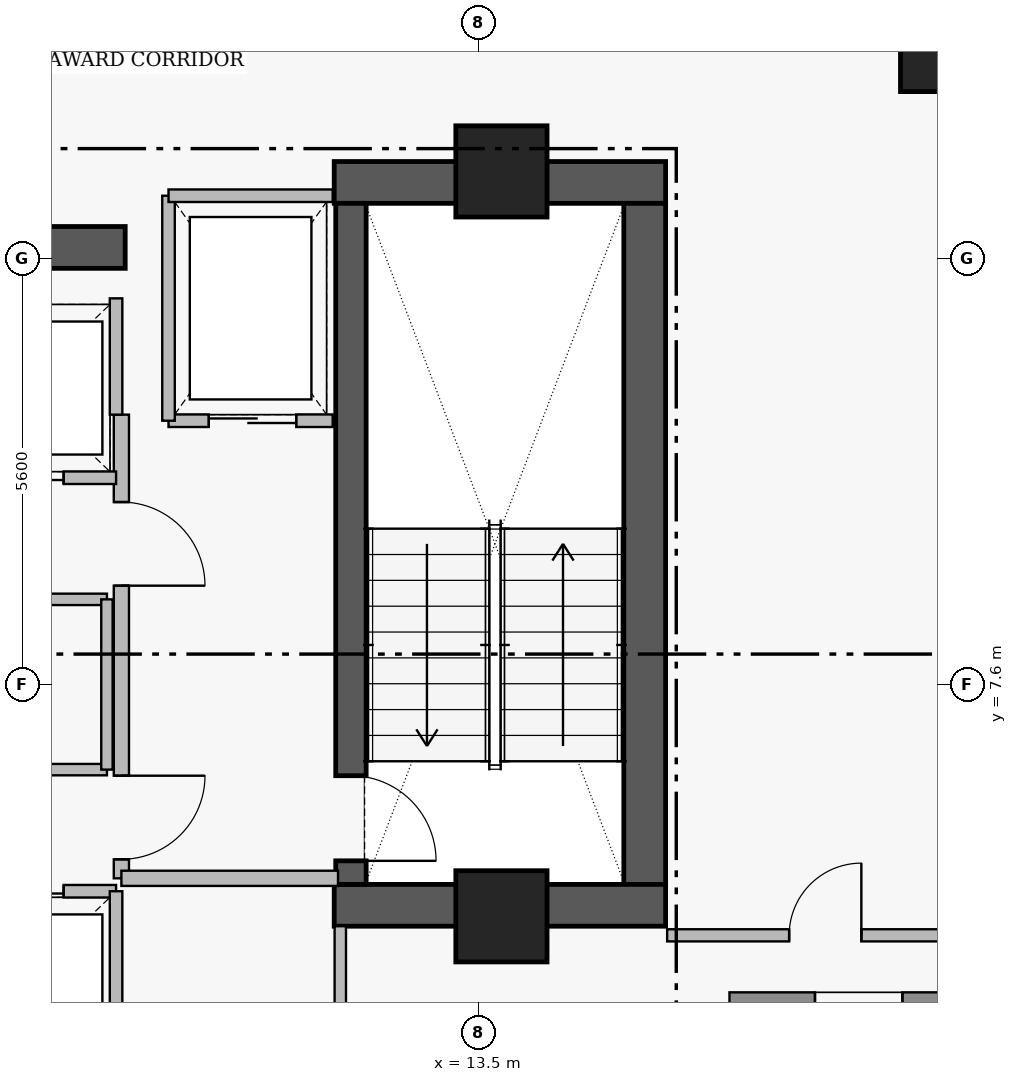
"""IFC4 building model, lengths in metres.
Left out: names, types, materials, properties, quantities, classifications, styles, units other than length and angle.
Written with IfcOpenShell. Run it as: python <this file> out.ifc"""

import sys

from ifc_helpers import new_model, si_unit, direction, frame, frame_2d, origin, origin_2d, place, context, subcontext, project, spatial, rectangle, extrude, element, fill, save


model = new_model("IFC4")
c1 = context("Model", 3, precision=1e-05, world=origin(), true_north=direction((0.0, 1.0)))
c2 = subcontext(c1, "Body", "Model", "MODEL_VIEW")
j1 = project(units=[si_unit("LENGTHUNIT", "METRE"), si_unit("PLANEANGLEUNIT", "RADIAN")], contexts=[c1])
p1 = place(None, origin())
s1 = spatial("IfcSite", under=j1, at=p1, CompositionType="ELEMENT")
p2 = place(p1, origin())
s2 = spatial("IfcBuilding", under=s1, at=p2, CompositionType="ELEMENT")
p3 = place(p2, frame((0.0, 0.0, 239.65)))
s3 = spatial("IfcBuildingStorey", under=s2, at=p3, CompositionType="ELEMENT", Elevation=239.65)
p4 = place(p3, frame((11.6, 14.205, 0.0), z_axis=(0.0, 0.0, 1.0), x_axis=(1.0, 0.0, 0.0)))
e1 = element("IfcWall", 1, at=p4, inside=s3, PredefinedType="SHEAR", context=c2, shape_type="SweptSolid", body=[
    extrude(rectangle(XDim=4.36, YDim=0.55, at=frame_2d((2.18, 0.0))), origin(), (0.0, 0.0, 1.0), 3.51),
])
p5 = place(p3, frame((15.685, 4.97, 0.0), z_axis=(0.0, 0.0, 1.0), x_axis=(0.0, 1.0, 0.0)))
e2 = element("IfcWall", 2, at=p5, inside=s3, PredefinedType="SHEAR", context=c2, shape_type="SweptSolid", body=[
    extrude(rectangle(XDim=8.96, YDim=0.55, at=frame_2d((4.48, 0.0))), origin(), (0.0, 0.0, 1.0), 3.51),
])
p6 = place(p3, frame((11.6, 4.695, 0.0), z_axis=(0.0, 0.0, 1.0), x_axis=(1.0, 0.0, 0.0)))
e3 = element("IfcWall", 3, at=p6, inside=s3, PredefinedType="SHEAR", context=c2, shape_type="SweptSolid", body=[
    extrude(rectangle(XDim=4.36, YDim=0.55, at=frame_2d((2.18, 0.0))), origin(), (0.0, 0.0, 1.0), 3.51),
])
p7 = place(p3, frame((1.25, 13.35, 0.0), z_axis=(0.0, 0.0, 1.0), x_axis=(1.0, 0.0, 0.0)))
e4 = element("IfcWall", 4, at=p7, inside=s3, PredefinedType="SHEAR", context=c2, shape_type="SweptSolid", body=[
    extrude(rectangle(XDim=7.6, YDim=0.55, at=frame_2d((3.8, 0.0))), origin(), (0.0, 0.0, 1.0), 3.48),
])
p8 = place(p3, frame((11.82, 13.93, 0.0), z_axis=(0.0, 0.0, 1.0), x_axis=(0.0, -1.0, 0.0)))
e5 = element("IfcWall", 5, at=p8, inside=s3, PredefinedType="SHEAR", context=c2, shape_type="SweptSolid", body=[
    extrude(rectangle(XDim=8.96, YDim=0.4, at=frame_2d((4.48, 0.0))), origin(), (0.0, 0.0, 1.0), 3.51),
])
p9 = place(p8, frame((7.53, 0.0, 0.0)))
e6 = element("IfcOpeningElement", 6, at=p9, cuts=e5, PredefinedType="OPENING", context=c2, shape_type="SweptSolid", body=[
    extrude(rectangle(XDim=1.12, YDim=2.22, at=frame_2d((0.56, 1.11))), frame((0.0, 0.21, 0.0), z_axis=(0.0, -1.0, 0.0), x_axis=(1.0, 0.0, 0.0)), (0.0, 0.0, 1.0), 0.42),
])
for number, where, z_axis, x_axis in (
    (7, (13.8, 14.35, 0.0), (0.0, 0.0, 1.0), (1.0, 0.0, 0.0)),
    (8, (13.8, 4.55, 0.0), (0.0, 0.0, 1.0), (1.0, 0.0, 0.0)),
):
    element("IfcColumn", number, at=place(p3, frame(where, z_axis=z_axis, x_axis=x_axis)), inside=s3, PredefinedType="COLUMN", context=c2, shape_type="SweptSolid", body=[
        extrude(rectangle(XDim=1.2, YDim=1.2, at=origin_2d()), origin(), (0.0, 0.0, 1.0), 3.7),
    ])
p10 = place(p3, frame((19.55, 15.9, 0.43), z_axis=(0.0, 0.0, 1.0), x_axis=(1.0, 0.0, 0.0)))
e9 = element("IfcColumn", 9, at=p10, inside=s3, PredefinedType="COLUMN", context=c2, shape_type="SweptSolid", body=[
    extrude(rectangle(XDim=1.0, YDim=1.0, at=origin_2d()), origin(), (0.0, 0.0, 1.0), 3.27),
])
p11 = place(p3, frame((20.2, 3.4, 0.0), z_axis=(0.0, 0.0, 1.0), x_axis=(-1.0, 0.0, 0.0)))
e10 = element("IfcWall", 10, at=p11, inside=s3, PredefinedType="STANDARD", context=c2, shape_type="SweptSolid", body=[
    extrude(rectangle(XDim=3.4, YDim=0.3, at=frame_2d((1.7, 0.0))), origin(), (0.0, 0.0, 1.0), 3.48),
])
p12 = place(p11, frame((1.125, 0.0, 1.25)))
e11 = element("IfcOpeningElement", 11, at=p12, cuts=e10, PredefinedType="OPENING", context=c2, shape_type="SweptSolid", body=[
    extrude(rectangle(XDim=1.15, YDim=1.55, at=frame_2d((0.575, 0.775))), frame((0.0, 0.16, 0.0), z_axis=(0.0, -1.0, 0.0), x_axis=(1.0, 0.0, 0.0)), (0.0, 0.0, 1.0), 0.32),
])
p13 = place(p3, frame((8.8, 11.15, 0.0), z_axis=(0.0, 0.0, 1.0), x_axis=(0.0, -1.0, 0.0)))
e12 = element("IfcWall", 12, at=p13, inside=s3, PredefinedType="PARTITIONING", context=c2, shape_type="SweptSolid", body=[
    extrude(rectangle(XDim=6.1, YDim=0.2, at=frame_2d((3.05, 0.0))), origin(), (0.0, 0.0, 1.0), 3.48),
])
p14 = place(p13, frame((1.15, 0.0, 0.0)))
e13 = element("IfcOpeningElement", 13, at=p14, cuts=e12, PredefinedType="OPENING", context=c2, shape_type="SweptSolid", body=[
    extrude(rectangle(XDim=1.1, YDim=2.2, at=frame_2d((0.55, 1.1))), frame((0.0, 0.11, 0.0), z_axis=(0.0, -1.0, 0.0), x_axis=(1.0, 0.0, 0.0)), (0.0, 0.0, 1.0), 0.22),
])
p15 = place(p13, frame((4.75, 0.0, 0.0)))
e14 = element("IfcOpeningElement", 14, at=p15, cuts=e12, PredefinedType="OPENING", context=c2, shape_type="SweptSolid", body=[
    extrude(rectangle(XDim=1.1, YDim=2.2, at=frame_2d((0.55, 1.1))), frame((0.0, 0.11, 0.0), z_axis=(0.0, -1.0, 0.0), x_axis=(1.0, 0.0, 0.0)), (0.0, 0.0, 1.0), 0.22),
])
p16 = place(p3, frame((9.42, 11.07, 0.0), z_axis=(0.0, 0.0, 1.0), x_axis=(1.0, 0.0, 0.0)))
e15 = element("IfcWall", 15, at=p16, inside=s3, PredefinedType="PARTITIONING", context=c2, shape_type="SweptSolid", body=[
    extrude(rectangle(XDim=2.16, YDim=0.165, at=frame_2d((1.08, 0.0))), origin(), (0.0, 0.0, 1.0), 3.48),
])
p17 = place(p16, frame((0.53, 0.0, 0.0)))
e16 = element("IfcOpeningElement", 16, at=p17, cuts=e15, PredefinedType="OPENING", context=c2, shape_type="SweptSolid", body=[
    extrude(rectangle(XDim=1.15, YDim=2.25, at=frame_2d((0.575, 1.125))), frame((0.0, 0.093, 0.0), z_axis=(0.0, -1.0, 0.0), x_axis=(1.0, 0.0, 0.0)), (0.0, 0.0, 1.0), 0.185),
])
p18 = place(p3, frame((6.25, 4.88, 0.0), z_axis=(0.0, 0.0, 1.0), x_axis=(1.0, 0.0, 0.0)))
e17 = element("IfcWall", 17, at=p18, inside=s3, PredefinedType="PARTITIONING", context=c2, shape_type="SweptSolid", body=[
    extrude(rectangle(XDim=2.48, YDim=0.165, at=frame_2d((1.24, 0.0))), origin(), (0.0, 0.0, 1.0), 3.48),
])
p19 = place(p18, frame((0.69, 0.0, 0.0)))
e18 = element("IfcOpeningElement", 18, at=p19, cuts=e17, PredefinedType="OPENING", context=c2, shape_type="SweptSolid", body=[
    extrude(rectangle(XDim=1.1, YDim=2.25, at=frame_2d((0.55, 1.125))), frame((0.0, 0.093, 0.0), z_axis=(0.0, -1.0, 0.0), x_axis=(1.0, 0.0, 0.0)), (0.0, 0.0, 1.0), 0.185),
])
p20 = place(p3, frame((6.25, 10.32, 0.0), z_axis=(0.0, 0.0, 1.0), x_axis=(1.0, 0.0, 0.0)))
e19 = element("IfcWall", 19, at=p20, inside=s3, PredefinedType="PARTITIONING", context=c2, shape_type="SweptSolid", body=[
    extrude(rectangle(XDim=2.48, YDim=0.165, at=frame_2d((1.24, 0.0))), origin(), (0.0, 0.0, 1.0), 3.48),
])
p21 = place(p20, frame((0.69, 0.0, 0.0)))
e20 = element("IfcOpeningElement", 20, at=p21, cuts=e19, PredefinedType="OPENING", context=c2, shape_type="SweptSolid", body=[
    extrude(rectangle(XDim=1.1, YDim=2.25, at=frame_2d((0.55, 1.125))), frame((0.0, 0.093, 0.0), z_axis=(0.0, -1.0, 0.0), x_axis=(1.0, 0.0, 0.0)), (0.0, 0.0, 1.0), 0.185),
])
p22 = place(p3, frame((6.14, 8.72, 0.0), z_axis=(0.0, 0.0, 1.0), x_axis=(1.0, 0.0, 0.0)))
e21 = element("IfcWall", 21, at=p22, inside=s3, PredefinedType="PARTITIONING", context=c2, shape_type="SweptSolid", body=[
    extrude(rectangle(XDim=2.47, YDim=0.15, at=frame_2d((1.235, 0.0))), origin(), (0.0, 0.0, 1.0), 3.48),
])
p23 = place(p22, frame((0.785, 0.0, 0.0)))
e22 = element("IfcOpeningElement", 22, at=p23, cuts=e21, PredefinedType="OPENING", context=c2, shape_type="SweptSolid", body=[
    extrude(rectangle(XDim=0.9, YDim=2.15, at=frame_2d((0.45, 1.075))), frame((0.0, 0.085, 0.0), z_axis=(0.0, -1.0, 0.0), x_axis=(1.0, 0.0, 0.0)), (0.0, 0.0, 1.0), 0.17),
])
p24 = place(p3, frame((15.98, 4.3, 0.0), z_axis=(0.0, 0.0, 1.0), x_axis=(1.0, 0.0, 0.0)))
e23 = element("IfcWall", 23, at=p24, inside=s3, PredefinedType="PARTITIONING", context=c2, shape_type="SweptSolid", body=[
    extrude(rectangle(XDim=4.16, YDim=0.16, at=frame_2d((2.08, 0.0))), origin(), (0.0, 0.0, 1.0), 3.48),
])
p25 = place(p24, frame((1.605, 0.0, 0.0)))
e24 = element("IfcOpeningElement", 24, at=p25, cuts=e23, PredefinedType="OPENING", context=c2, shape_type="SweptSolid", body=[
    extrude(rectangle(XDim=0.95, YDim=2.15, at=frame_2d((0.475, 1.075))), frame((0.0, 0.09, 0.0), z_axis=(0.0, -1.0, 0.0), x_axis=(1.0, 0.0, 0.0)), (0.0, 0.0, 1.0), 0.18),
])
p26 = place(p3, frame((8.8, 5.05, 0.0), z_axis=(0.0, 0.0, 1.0), x_axis=(1.0, 0.0, 0.0)))
e25 = element("IfcWall", 25, at=p26, inside=s3, PredefinedType="PARTITIONING", context=c2, shape_type="SweptSolid", body=[
    extrude(rectangle(XDim=2.85, YDim=0.2, at=frame_2d((1.425, 0.0))), origin(), (0.0, 0.0, 1.0), 3.48),
])
p27 = place(p3, frame((9.42, 11.07, 0.0), z_axis=(0.0, 0.0, 1.0), x_axis=(0.0, 1.0, 0.0)))
e26 = element("IfcWall", 26, at=p27, inside=s3, PredefinedType="PARTITIONING", context=c2, shape_type="SweptSolid", body=[
    extrude(rectangle(XDim=2.96, YDim=0.165, at=frame_2d((1.48, 0.0))), origin(), (0.0, 0.0, 1.0), 3.48),
])
p28 = place(p3, frame((9.42, 14.03, 0.0), z_axis=(0.0, 0.0, 1.0), x_axis=(1.0, 0.0, 0.0)))
e27 = element("IfcWall", 27, at=p28, inside=s3, PredefinedType="PARTITIONING", context=c2, shape_type="SweptSolid", body=[
    extrude(rectangle(XDim=2.16, YDim=0.165, at=frame_2d((1.08, 0.0))), origin(), (0.0, 0.0, 1.0), 3.48),
])
p29 = place(p3, frame((8.73, 2.52, 0.0), z_axis=(0.0, 0.0, 1.0), x_axis=(0.0, 1.0, 0.0)))
e28 = element("IfcWall", 28, at=p29, inside=s3, PredefinedType="PARTITIONING", context=c2, shape_type="SweptSolid", body=[
    extrude(rectangle(XDim=2.36, YDim=0.165, at=frame_2d((1.18, 0.0))), origin(), (0.0, 0.0, 1.0), 3.48),
])
p30 = place(p3, frame((8.73, 11.15, 0.0), z_axis=(0.0, 0.0, 1.0), x_axis=(0.0, 1.0, 0.0)))
e29 = element("IfcWall", 29, at=p30, inside=s3, PredefinedType="PARTITIONING", context=c2, shape_type="SweptSolid", body=[
    extrude(rectangle(XDim=1.53, YDim=0.165, at=frame_2d((0.765, 0.0))), origin(), (0.0, 0.0, 1.0), 3.48),
])
p31 = place(p3, frame((6.14, 6.48, 0.0), z_axis=(0.0, 0.0, 1.0), x_axis=(1.0, 0.0, 0.0)))
e30 = element("IfcWall", 30, at=p31, inside=s3, PredefinedType="PARTITIONING", context=c2, shape_type="SweptSolid", body=[
    extrude(rectangle(XDim=2.47, YDim=0.15, at=frame_2d((1.235, 0.0))), origin(), (0.0, 0.0, 1.0), 3.48),
])
p32 = place(p3, frame((8.61, 6.48, 0.0), z_axis=(0.0, 0.0, 1.0), x_axis=(0.0, 1.0, 0.0)))
e31 = element("IfcWall", 31, at=p32, inside=s3, PredefinedType="PARTITIONING", context=c2, shape_type="SweptSolid", body=[
    extrude(rectangle(XDim=2.24, YDim=0.15, at=frame_2d((1.12, 0.0))), origin(), (0.0, 0.0, 1.0), 3.48),
])
p33 = place(p3, frame((11.68, 1.72, 0.0), z_axis=(0.0, 0.0, 1.0), x_axis=(0.0, 1.0, 0.0)))
e32 = element("IfcWall", 32, at=p33, inside=s3, PredefinedType="PARTITIONING", context=c2, shape_type="SweptSolid", body=[
    extrude(rectangle(XDim=2.7, YDim=0.15, at=frame_2d((1.35, 0.0))), origin(), (0.0, 0.0, 1.0), 3.48),
])
p34 = place(p12, origin())
e33 = element("IfcWindow", 33, at=p34, inside=s3, PartitioningType="SINGLE_PANEL", PredefinedType="WINDOW", context=c2, shape_type="SweptSolid", body=[
    extrude(rectangle(XDim=1.15, YDim=1.55, at=frame_2d((0.575, 0.775))), frame((0.0, 0.03, 0.0), z_axis=(0.0, -1.0, 0.0), x_axis=(1.0, 0.0, 0.0)), (0.0, 0.0, 1.0), 0.06),
])
fill(e11, e33)
p35 = place(p9, origin())
e34 = element("IfcDoor", 34, at=p35, inside=s3, OperationType="SINGLE_SWING_RIGHT", PredefinedType="DOOR", context=c2, shape_type="SweptSolid", body=[
    extrude(rectangle(XDim=1.12, YDim=2.22, at=frame_2d((0.56, 1.11))), frame((0.0, 0.025, 0.0), z_axis=(0.0, -1.0, 0.0), x_axis=(1.0, 0.0, 0.0)), (0.0, 0.0, 1.0), 0.05),
])
fill(e6, e34)
p36 = place(p14, origin())
e35 = element("IfcDoor", 35, at=p36, inside=s3, OperationType="SINGLE_SWING_RIGHT", PredefinedType="DOOR", context=c2, shape_type="SweptSolid", body=[
    extrude(rectangle(XDim=1.1, YDim=2.2, at=frame_2d((0.55, 1.1))), frame((0.0, 0.025, 0.0), z_axis=(0.0, -1.0, 0.0), x_axis=(1.0, 0.0, 0.0)), (0.0, 0.0, 1.0), 0.05),
])
fill(e13, e35)
p37 = place(p15, origin())
e36 = element("IfcDoor", 36, at=p37, inside=s3, OperationType="SINGLE_SWING_LEFT", PredefinedType="DOOR", context=c2, shape_type="SweptSolid", body=[
    extrude(rectangle(XDim=1.1, YDim=2.2, at=frame_2d((0.55, 1.1))), frame((0.0, 0.025, 0.0), z_axis=(0.0, -1.0, 0.0), x_axis=(1.0, 0.0, 0.0)), (0.0, 0.0, 1.0), 0.05),
])
fill(e14, e36)
p38 = place(p17, origin())
e37 = element("IfcDoor", 37, at=p38, inside=s3, OperationType="SLIDING_TO_LEFT", PredefinedType="DOOR", context=c2, shape_type="SweptSolid", body=[
    extrude(rectangle(XDim=1.15, YDim=2.25, at=frame_2d((0.575, 1.125))), frame((0.0, 0.025, 0.0), z_axis=(0.0, -1.0, 0.0), x_axis=(1.0, 0.0, 0.0)), (0.0, 0.0, 1.0), 0.05),
])
fill(e16, e37)
p39 = place(p19, origin())
e38 = element("IfcDoor", 38, at=p39, inside=s3, OperationType="SLIDING_TO_LEFT", PredefinedType="DOOR", context=c2, shape_type="SweptSolid", body=[
    extrude(rectangle(XDim=1.1, YDim=2.25, at=frame_2d((0.55, 1.125))), frame((0.0, 0.025, 0.0), z_axis=(0.0, -1.0, 0.0), x_axis=(1.0, 0.0, 0.0)), (0.0, 0.0, 1.0), 0.05),
])
fill(e18, e38)
p40 = place(p21, origin())
e39 = element("IfcDoor", 39, at=p40, inside=s3, OperationType="SLIDING_TO_LEFT", PredefinedType="DOOR", context=c2, shape_type="SweptSolid", body=[
    extrude(rectangle(XDim=1.1, YDim=2.25, at=frame_2d((0.55, 1.125))), frame((0.0, 0.025, 0.0), z_axis=(0.0, -1.0, 0.0), x_axis=(1.0, 0.0, 0.0)), (0.0, 0.0, 1.0), 0.05),
])
fill(e20, e39)
p41 = place(p25, origin())
e40 = element("IfcDoor", 40, at=p41, inside=s3, OperationType="SINGLE_SWING_RIGHT", PredefinedType="DOOR", context=c2, shape_type="SweptSolid", body=[
    extrude(rectangle(XDim=0.95, YDim=2.15, at=frame_2d((0.475, 1.075))), frame((0.0, 0.025, 0.0), z_axis=(0.0, -1.0, 0.0), x_axis=(1.0, 0.0, 0.0)), (0.0, 0.0, 1.0), 0.05),
])
fill(e24, e40)
save(model, sys.argv[1])
